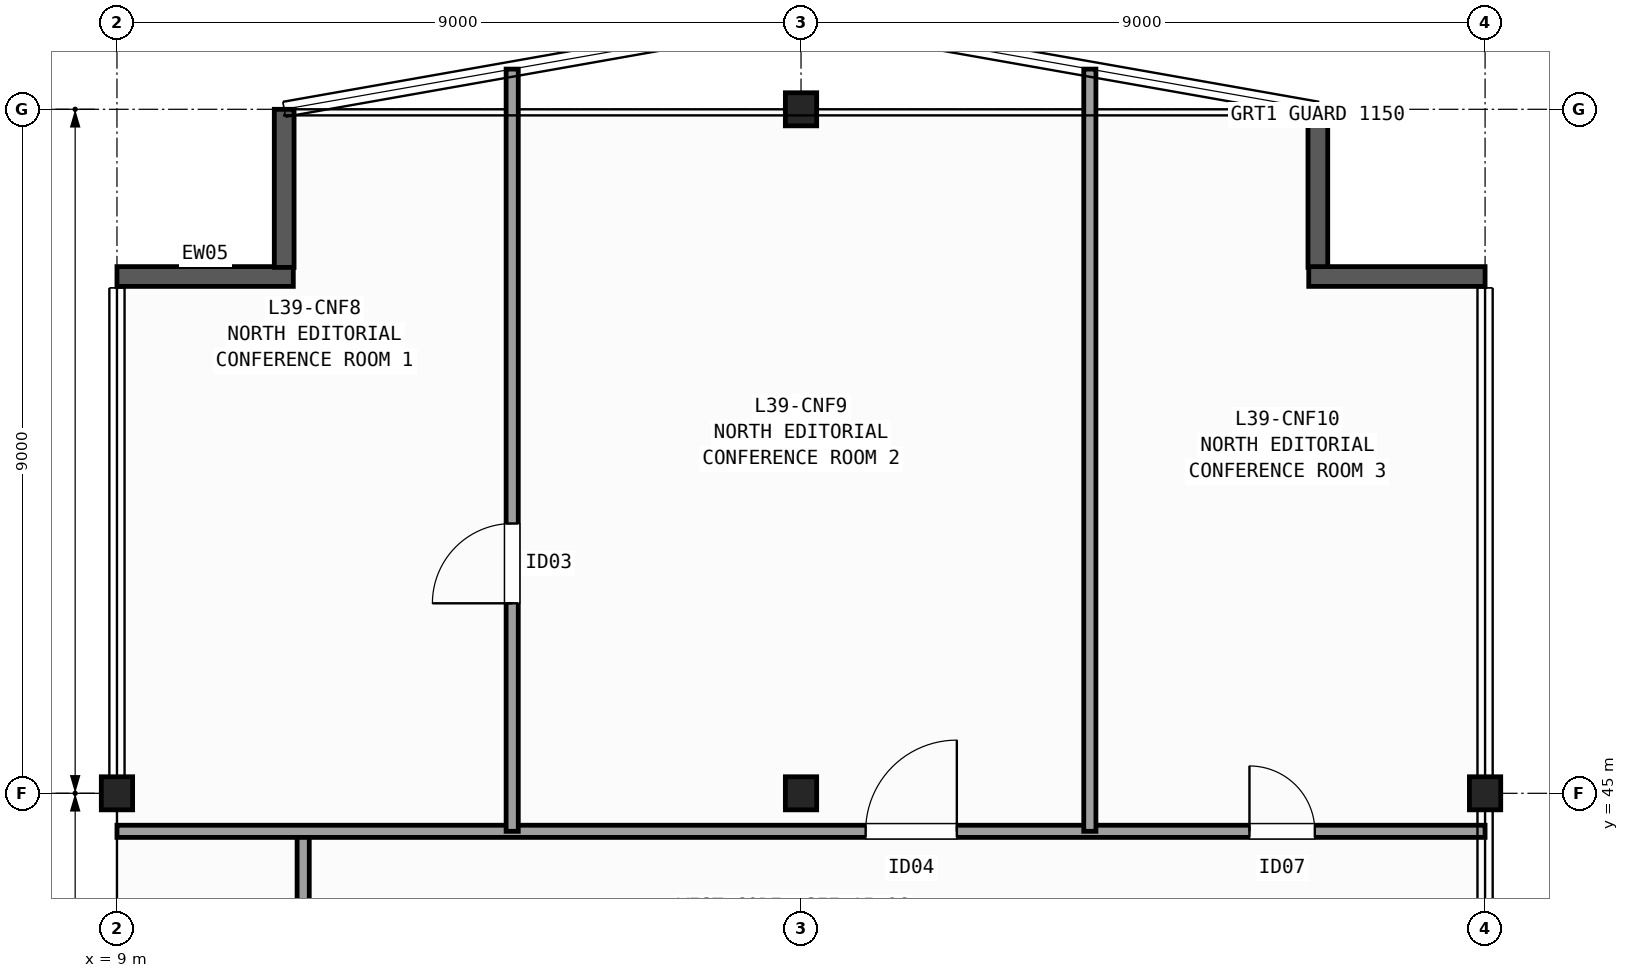
"""IFC4 building model, lengths in metres.
Left out: names, types, materials, properties, quantities, classifications, styles, units other than length and angle.
Written with IfcOpenShell. Run it as: python <this file> out.ifc"""

import sys

from ifc_helpers import new_model, si_unit, direction, frame, frame_2d, origin, origin_2d, place, context, subcontext, project, spatial, rectangle, i_section, extrude, element, fill, save


model = new_model("IFC4")
c1 = context("Model", 3, precision=1e-05, world=origin(), true_north=direction((0.0, 1.0)))
c2 = subcontext(c1, "Body", "Model", "MODEL_VIEW")
j1 = project(units=[si_unit("LENGTHUNIT", "METRE"), si_unit("PLANEANGLEUNIT", "RADIAN")], contexts=[c1])
p1 = place(None, origin())
s1 = spatial("IfcSite", under=j1, at=p1, CompositionType="ELEMENT")
p2 = place(p1, origin())
s2 = spatial("IfcBuilding", under=s1, at=p2, CompositionType="ELEMENT")
p3 = place(p2, frame((0.0, 0.0, 158.1)))
s3 = spatial("IfcBuildingStorey", under=s2, at=p3, CompositionType="ELEMENT", Elevation=158.1)
for number, where, z_axis, x_axis in (
    (1, (9.0, 45.0, 0.0), (0.0, 0.0, 1.0), (1.0, 0.0, 0.0)),
    (2, (18.0, 45.0, 0.0), (0.0, 0.0, 1.0), (1.0, 0.0, 0.0)),
    (3, (18.0, 54.0, 0.0), (0.0, 0.0, 1.0), (1.0, 0.0, 0.0)),
    (4, (27.0, 45.0, 0.0), (0.0, 0.0, 1.0), (1.0, 0.0, 0.0)),
):
    element("IfcColumn", number, at=place(p3, frame(where, z_axis=z_axis, x_axis=x_axis)), inside=s3, PredefinedType="COLUMN", context=c2, shape_type="SweptSolid", body=[
        extrude(i_section(OverallWidth=0.412, OverallDepth=0.435, WebThickness=0.036, FlangeThickness=0.057, FilletRadius=0.015, at=origin_2d()), origin(), (0.0, 0.0, 1.0), 3.7),
    ])
p4 = place(p3, frame((9.0, 51.8, 0.0), z_axis=(0.0, 0.0, 1.0), x_axis=(1.0, 0.0, 0.0)))
e5 = element("IfcWall", 5, at=p4, inside=s3, PredefinedType="SOLIDWALL", context=c2, shape_type="SweptSolid", body=[
    extrude(rectangle(XDim=2.32, YDim=0.26, at=frame_2d((1.16, 0.0))), origin(), (0.0, 0.0, 1.0), 3.42),
])
for number, where, z_axis, x_axis in (
    (6, (11.2, 51.92, 0.0), (0.0, 0.0, 1.0), (0.0, 1.0, 0.0)),
    (7, (24.8, 54.0, 0.0), (0.0, 0.0, 1.0), (0.0, -1.0, 0.0)),
):
    element("IfcWall", number, at=place(p3, frame(where, z_axis=z_axis, x_axis=x_axis)), inside=s3, PredefinedType="SOLIDWALL", context=c2, shape_type="SweptSolid", body=[
        extrude(rectangle(XDim=2.08, YDim=0.26, at=frame_2d((1.04, 0.0))), origin(), (0.0, 0.0, 1.0), 3.42),
    ])
p5 = place(p3, frame((24.68, 51.8, 0.0), z_axis=(0.0, 0.0, 1.0), x_axis=(1.0, 0.0, 0.0)))
e8 = element("IfcWall", 8, at=p5, inside=s3, PredefinedType="SOLIDWALL", context=c2, shape_type="SweptSolid", body=[
    extrude(rectangle(XDim=2.32, YDim=0.26, at=frame_2d((1.16, 0.0))), origin(), (0.0, 0.0, 1.0), 3.42),
])
p6 = place(p3, frame((11.45, 42.4, 0.0), z_axis=(0.0, 0.0, 1.0), x_axis=(0.0, 1.0, 0.0)))
e9 = element("IfcWall", 9, at=p6, inside=s3, PredefinedType="PARTITIONING", context=c2, shape_type="SweptSolid", body=[
    extrude(rectangle(XDim=2.1, YDim=0.16, at=frame_2d((1.05, 0.0))), origin(), (0.0, 0.0, 1.0), 3.42),
])
p7 = place(p3, frame((9.0, 44.5, 0.0), z_axis=(0.0, 0.0, 1.0), x_axis=(1.0, 0.0, 0.0)))
e10 = element("IfcWall", 10, at=p7, inside=s3, PredefinedType="PARTITIONING", context=c2, shape_type="SweptSolid", body=[
    extrude(rectangle(XDim=18.0, YDim=0.16, at=frame_2d((9.0, 0.0))), origin(), (0.0, 0.0, 1.0), 2.634),
])
p8 = place(p7, frame((9.85, 0.0, 0.0)))
e11 = element("IfcOpeningElement", 11, at=p8, cuts=e10, PredefinedType="OPENING", context=c2, shape_type="SweptSolid", body=[
    extrude(rectangle(XDim=1.2, YDim=2.15, at=frame_2d((0.6, 1.075))), frame((0.0, 0.09, 0.0), z_axis=(0.0, -1.0, 0.0), x_axis=(1.0, 0.0, 0.0)), (0.0, 0.0, 1.0), 0.18),
])
p9 = place(p7, frame((14.9, 0.0, 0.0)))
e12 = element("IfcOpeningElement", 12, at=p9, cuts=e10, PredefinedType="OPENING", context=c2, shape_type="SweptSolid", body=[
    extrude(rectangle(XDim=0.86, YDim=2.05, at=frame_2d((0.43, 1.025))), frame((0.0, 0.09, 0.0), z_axis=(0.0, -1.0, 0.0), x_axis=(1.0, 0.0, 0.0)), (0.0, 0.0, 1.0), 0.18),
])
p10 = place(p3, frame((14.2, 44.5, 0.0), z_axis=(0.0, 0.0, 1.0), x_axis=(0.0, 1.0, 0.0)))
e13 = element("IfcWall", 13, at=p10, inside=s3, PredefinedType="PARTITIONING", context=c2, shape_type="SweptSolid", body=[
    extrude(rectangle(XDim=10.029, YDim=0.16, at=frame_2d((5.015, 0.0))), origin(), (0.0, 0.0, 1.0), 3.42),
])
p11 = place(p10, frame((3.0, 0.0, 0.0)))
e14 = element("IfcOpeningElement", 14, at=p11, cuts=e13, PredefinedType="OPENING", context=c2, shape_type="SweptSolid", body=[
    extrude(rectangle(XDim=1.05, YDim=2.15, at=frame_2d((0.525, 1.075))), frame((0.0, 0.09, 0.0), z_axis=(0.0, -1.0, 0.0), x_axis=(1.0, 0.0, 0.0)), (0.0, 0.0, 1.0), 0.18),
])
p12 = place(p3, frame((21.8, 44.5, 0.0), z_axis=(0.0, 0.0, 1.0), x_axis=(0.0, 1.0, 0.0)))
e15 = element("IfcWall", 15, at=p12, inside=s3, PredefinedType="PARTITIONING", context=c2, shape_type="SweptSolid", body=[
    extrude(rectangle(XDim=10.029, YDim=0.16, at=frame_2d((5.015, 0.0))), origin(), (0.0, 0.0, 1.0), 3.42),
])
p13 = place(p11, origin())
e16 = element("IfcDoor", 16, at=p13, inside=s3, OperationType="SINGLE_SWING_LEFT", PredefinedType="DOOR", context=c2, shape_type="SweptSolid", body=[
    extrude(rectangle(XDim=1.05, YDim=2.15, at=frame_2d((0.525, 1.075))), frame((0.0, 0.025, 0.0), z_axis=(0.0, -1.0, 0.0), x_axis=(1.0, 0.0, 0.0)), (0.0, 0.0, 1.0), 0.05),
])
fill(e14, e16)
p14 = place(p8, origin())
e17 = element("IfcDoor", 17, at=p14, inside=s3, OperationType="SINGLE_SWING_RIGHT", PredefinedType="DOOR", context=c2, shape_type="SweptSolid", body=[
    extrude(rectangle(XDim=1.2, YDim=2.15, at=frame_2d((0.6, 1.075))), frame((0.0, 0.025, 0.0), z_axis=(0.0, -1.0, 0.0), x_axis=(1.0, 0.0, 0.0)), (0.0, 0.0, 1.0), 0.05),
])
fill(e11, e17)
p15 = place(p9, origin())
e18 = element("IfcDoor", 18, at=p15, inside=s3, OperationType="SINGLE_SWING_LEFT", PredefinedType="DOOR", context=c2, shape_type="SweptSolid", body=[
    extrude(rectangle(XDim=0.86, YDim=2.05, at=frame_2d((0.43, 1.025))), frame((0.0, 0.025, 0.0), z_axis=(0.0, -1.0, 0.0), x_axis=(1.0, 0.0, 0.0)), (0.0, 0.0, 1.0), 0.05),
])
fill(e12, e18)
save(model, sys.argv[1])
